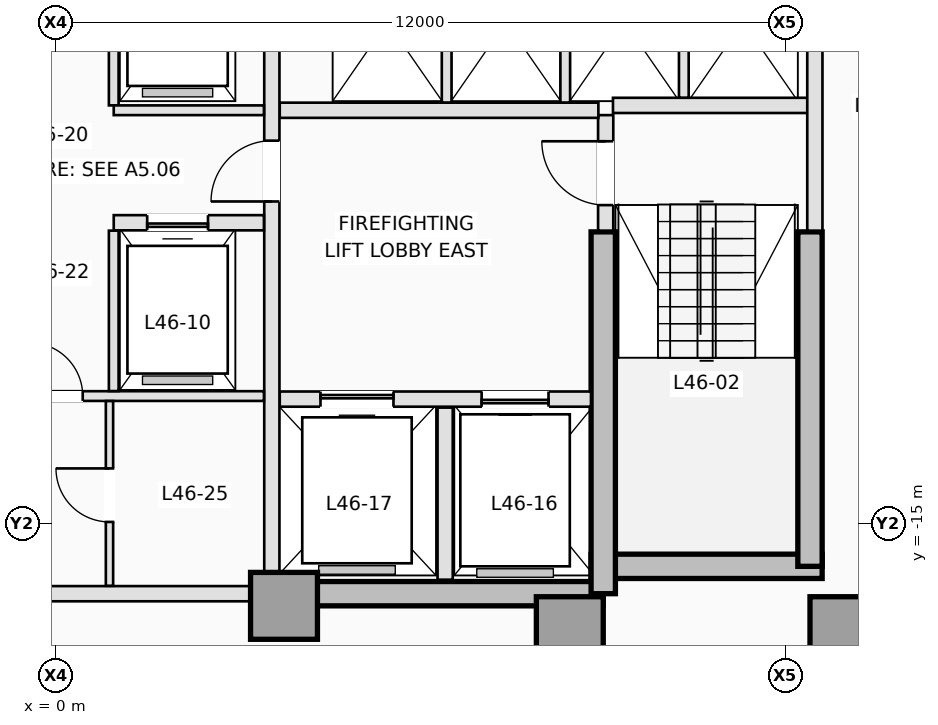
"""IFC4 building model, lengths in metres.
Left out: names, types, materials, properties, quantities, classifications, styles, units other than length and angle.
Written with IfcOpenShell. Run it as: python <this file> out.ifc"""

import sys

from ifc_helpers import new_model, si_unit, direction, frame, frame_2d, origin, origin_2d, place, context, subcontext, project, spatial, rectangle, extrude, element, fill, save


model = new_model("IFC4")
c1 = context("Model", 3, precision=1e-05, world=origin(), true_north=direction((0.0, 1.0)))
c2 = subcontext(c1, "Body", "Model", "MODEL_VIEW")
j1 = project(units=[si_unit("LENGTHUNIT", "METRE"), si_unit("PLANEANGLEUNIT", "RADIAN")], contexts=[c1])
p1 = place(None, origin())
s1 = spatial("IfcSite", under=j1, at=p1, CompositionType="ELEMENT")
p2 = place(p1, origin())
s2 = spatial("IfcBuilding", under=s1, at=p2, CompositionType="ELEMENT")
p3 = place(p2, frame((0.0, 0.0, 168.5)))
s3 = spatial("IfcBuildingStorey", under=s2, at=p3, CompositionType="ELEMENT", Elevation=168.5)
p4 = place(p3, frame((3.75, -16.15, 0.0), z_axis=(0.0, 0.0, 1.0), x_axis=(1.0, 0.0, 0.0)))
e1 = element("IfcWall", 1, at=p4, inside=s3, PredefinedType="SHEAR", context=c2, shape_type="SweptSolid", body=[
    extrude(rectangle(XDim=5.25, YDim=0.4, at=frame_2d((2.625, 0.0))), origin(), (0.0, 0.0, 1.0), 3.5),
])
p5 = place(p3, frame((8.8, -15.7, 0.0), z_axis=(0.0, 0.0, 1.0), x_axis=(1.0, 0.0, 0.0)))
e2 = element("IfcWall", 2, at=p5, inside=s3, PredefinedType="SHEAR", context=c2, shape_type="SweptSolid", body=[
    extrude(rectangle(XDim=3.8, YDim=0.4, at=frame_2d((1.9, 0.0))), origin(), (0.0, 0.0, 1.0), 3.5),
])
p6 = place(p3, frame((12.4, -15.7, 0.0), z_axis=(0.0, 0.0, 1.0), x_axis=(0.0, 1.0, 0.0)))
e3 = element("IfcWall", 3, at=p6, inside=s3, PredefinedType="SHEAR", context=c2, shape_type="SweptSolid", body=[
    extrude(rectangle(XDim=5.5, YDim=0.4, at=frame_2d((2.75, 0.0))), origin(), (0.0, 0.0, 1.0), 3.5),
])
p7 = place(p3, frame((9.0, -16.15, 0.0), z_axis=(0.0, 0.0, 1.0), x_axis=(0.0, 1.0, 0.0)))
e4 = element("IfcWall", 4, at=p7, inside=s3, PredefinedType="SHEAR", context=c2, shape_type="SweptSolid", body=[
    extrude(rectangle(XDim=5.95, YDim=0.4, at=frame_2d((2.975, 0.0))), origin(), (0.0, 0.0, 1.0), 3.5),
])
for number, where, z_axis, x_axis in (
    (5, (3.75, -16.35, 0.0), (0.0, 0.0, 1.0), (1.0, 0.0, 0.0)),
    (6, (8.45, -16.75, 0.0), (0.0, 0.0, 1.0), (1.0, 0.0, 0.0)),
    (7, (12.95, -16.75, 0.0), (0.0, 0.0, 1.0), (1.0, 0.0, 0.0)),
):
    element("IfcColumn", number, at=place(p3, frame(where, z_axis=z_axis, x_axis=x_axis)), inside=s3, PredefinedType="COLUMN", context=c2, shape_type="SweptSolid", body=[
        extrude(rectangle(XDim=1.1, YDim=1.1, at=origin_2d()), origin(), (0.0, 0.0, 1.0), 3.5),
    ])
p8 = place(p3, frame((9.04, -10.18, 0.0), z_axis=(0.0, 0.0, 1.0), x_axis=(0.0, 1.0, 0.0)))
e8 = element("IfcWall", 8, at=p8, inside=s3, PredefinedType="PARTITIONING", context=c2, shape_type="SweptSolid", body=[
    extrude(rectangle(XDim=1.9, YDim=0.25, at=frame_2d((0.95, 0.0))), origin(), (0.0, 0.0, 1.0), 3.25),
])
p9 = place(p8, frame((0.42, 0.0, 0.0)))
e9 = element("IfcOpeningElement", 9, at=p9, cuts=e8, PredefinedType="OPENING", context=c2, shape_type="SweptSolid", body=[
    extrude(rectangle(XDim=1.05, YDim=2.15, at=frame_2d((0.525, 1.075))), frame((0.0, 0.135, 0.0), z_axis=(0.0, -1.0, 0.0), x_axis=(1.0, 0.0, 0.0)), (0.0, 0.0, 1.0), 0.27),
])
p10 = place(p3, frame((9.16, -8.12, 0.0), z_axis=(0.0, 0.0, 1.0), x_axis=(1.0, 0.0, 0.0)))
e10 = element("IfcWall", 10, at=p10, inside=s3, PredefinedType="PARTITIONING", context=c2, shape_type="SweptSolid", body=[
    extrude(rectangle(XDim=3.22, YDim=0.25, at=frame_2d((1.61, 0.0))), origin(), (0.0, 0.0, 1.0), 3.25),
])
p11 = place(p3, frame((12.48, -10.18, 0.0), z_axis=(0.0, 0.0, 1.0), x_axis=(0.0, 1.0, 0.0)))
e11 = element("IfcWall", 11, at=p11, inside=s3, PredefinedType="PARTITIONING", context=c2, shape_type="SweptSolid", body=[
    extrude(rectangle(XDim=4.828, YDim=0.25, at=frame_2d((2.414, 0.0))), origin(), (0.0, 0.0, 1.0), 3.25),
])
p12 = place(p3, frame((3.68, -12.95, 0.0), z_axis=(0.0, 0.0, 1.0), x_axis=(1.0, 0.0, 0.0)))
e12 = element("IfcWall", 12, at=p12, inside=s3, PredefinedType="PARTITIONING", context=c2, shape_type="SweptSolid", body=[
    extrude(rectangle(XDim=5.118, YDim=0.25, at=frame_2d((2.559, 0.0))), origin(), (0.0, 0.0, 1.0), 3.25),
])
p13 = place(p12, frame((3.32, 0.0, 0.0)))
e13 = element("IfcOpeningElement", 13, at=p13, cuts=e12, PredefinedType="OPENING", context=c2, shape_type="SweptSolid", body=[
    extrude(rectangle(XDim=1.1, YDim=2.15, at=frame_2d((0.55, 1.075))), frame((0.0, 0.135, 0.0), z_axis=(0.0, -1.0, 0.0), x_axis=(1.0, 0.0, 0.0)), (0.0, 0.0, 1.0), 0.27),
])
p14 = place(p12, frame((0.67, 0.0, 0.0)))
e14 = element("IfcOpeningElement", 14, at=p14, cuts=e12, PredefinedType="OPENING", context=c2, shape_type="SweptSolid", body=[
    extrude(rectangle(XDim=1.2, YDim=2.15, at=frame_2d((0.6, 1.075))), frame((0.0, 0.135, 0.0), z_axis=(0.0, -1.0, 0.0), x_axis=(1.0, 0.0, 0.0)), (0.0, 0.0, 1.0), 0.27),
])
p15 = place(p3, frame((6.4, -15.92, 0.0), z_axis=(0.0, 0.0, 1.0), x_axis=(0.0, 1.0, 0.0)))
e15 = element("IfcWall", 15, at=p15, inside=s3, PredefinedType="PARTITIONING", context=c2, shape_type="SweptSolid", body=[
    extrude(rectangle(XDim=2.83, YDim=0.25, at=frame_2d((1.415, 0.0))), origin(), (0.0, 0.0, 1.0), 3.25),
])
p16 = place(p3, frame((3.68, -8.2, 0.0), z_axis=(0.0, 0.0, 1.0), x_axis=(1.0, 0.0, 0.0)))
e16 = element("IfcWall", 16, at=p16, inside=s3, PredefinedType="PARTITIONING", context=c2, shape_type="SweptSolid", body=[
    extrude(rectangle(XDim=5.24, YDim=0.25, at=frame_2d((2.62, 0.0))), origin(), (0.0, 0.0, 1.0), 3.25),
])
p17 = place(p3, frame((3.55, -15.798, 0.0), z_axis=(0.0, 0.0, 1.0), x_axis=(0.0, 1.0, 0.0)))
e17 = element("IfcWall", 17, at=p17, inside=s3, PredefinedType="PARTITIONING", context=c2, shape_type="SweptSolid", body=[
    extrude(rectangle(XDim=10.446, YDim=0.25, at=frame_2d((5.223, 0.0))), origin(), (0.0, 0.0, 1.0), 3.25),
])
p18 = place(p17, frame((6.098, 0.0, 0.0)))
e18 = element("IfcOpeningElement", 18, at=p18, cuts=e17, PredefinedType="OPENING", context=c2, shape_type="SweptSolid", body=[
    extrude(rectangle(XDim=1.0, YDim=2.15, at=frame_2d((0.5, 1.075))), frame((0.0, 0.135, 0.0), z_axis=(0.0, -1.0, 0.0), x_axis=(1.0, 0.0, 0.0)), (0.0, 0.0, 1.0), 0.27),
])
for number, where, z_axis, x_axis in (
    (19, (6.425, -8.073, 0.0), (0.0, 0.0, 1.0), (0.0, 1.0, 0.0)),
    (20, (8.375, -8.073, 0.0), (0.0, 0.0, 1.0), (0.0, 1.0, 0.0)),
):
    element("IfcWall", number, at=place(p3, frame(where, z_axis=z_axis, x_axis=x_axis)), inside=s3, PredefinedType="PARTITIONING", context=c2, shape_type="SweptSolid", body=[
        extrude(rectangle(XDim=2.733, YDim=0.16, at=frame_2d((1.366, 0.0))), origin(), (0.0, 0.0, 1.0), 3.25),
    ])
p19 = place(p3, frame((10.325, -7.993, 0.0), z_axis=(0.0, 0.0, 1.0), x_axis=(0.0, 1.0, 0.0)))
e21 = element("IfcWall", 21, at=p19, inside=s3, PredefinedType="PARTITIONING", context=c2, shape_type="SweptSolid", body=[
    extrude(rectangle(XDim=2.653, YDim=0.16, at=frame_2d((1.326, 0.0))), origin(), (0.0, 0.0, 1.0), 3.25),
])
p20 = place(p3, frame((-3.198, -16.15, 0.0), z_axis=(0.0, 0.0, 1.0), x_axis=(1.0, 0.0, 0.0)))
e22 = element("IfcWall", 22, at=p20, inside=s3, PredefinedType="PARTITIONING", context=c2, shape_type="SweptSolid", body=[
    extrude(rectangle(XDim=6.396, YDim=0.25, at=frame_2d((3.198, 0.0))), origin(), (0.0, 0.0, 1.0), 2.45),
])
p21 = place(p3, frame((0.95, -8.12, 0.0), z_axis=(0.0, 0.0, 1.0), x_axis=(0.0, 1.0, 0.0)))
e23 = element("IfcWall", 23, at=p21, inside=s3, PredefinedType="PARTITIONING", context=c2, shape_type="SweptSolid", body=[
    extrude(rectangle(XDim=2.78, YDim=0.16, at=frame_2d((1.39, 0.0))), origin(), (0.0, 0.0, 1.0), 3.25),
])
p22 = place(p3, frame((0.95, -8.2, 0.0), z_axis=(0.0, 0.0, 1.0), x_axis=(1.0, 0.0, 0.0)))
e24 = element("IfcWall", 24, at=p22, inside=s3, PredefinedType="PARTITIONING", context=c2, shape_type="SweptSolid", body=[
    extrude(rectangle(XDim=2.47, YDim=0.16, at=frame_2d((1.235, 0.0))), origin(), (0.0, 0.0, 1.0), 3.25),
])
p23 = place(p3, frame((0.95, -10.05, 0.0), z_axis=(0.0, 0.0, 1.0), x_axis=(1.0, 0.0, 0.0)))
e25 = element("IfcWall", 25, at=p23, inside=s3, PredefinedType="PARTITIONING", context=c2, shape_type="SweptSolid", body=[
    extrude(rectangle(XDim=2.47, YDim=0.25, at=frame_2d((1.235, 0.0))), origin(), (0.0, 0.0, 1.0), 3.25),
])
p24 = place(p23, frame((0.55, 0.0, 0.0)))
e26 = element("IfcOpeningElement", 26, at=p24, cuts=e25, PredefinedType="OPENING", context=c2, shape_type="SweptSolid", body=[
    extrude(rectangle(XDim=1.0, YDim=2.15, at=frame_2d((0.5, 1.075))), frame((0.0, 0.135, 0.0), z_axis=(0.0, -1.0, 0.0), x_axis=(1.0, 0.0, 0.0)), (0.0, 0.0, 1.0), 0.27),
])
p25 = place(p3, frame((-3.42, -12.9, 0.0), z_axis=(0.0, 0.0, 1.0), x_axis=(1.0, 0.0, 0.0)))
e27 = element("IfcWall", 27, at=p25, inside=s3, PredefinedType="PARTITIONING", context=c2, shape_type="SweptSolid", body=[
    extrude(rectangle(XDim=6.84, YDim=0.16, at=frame_2d((3.42, 0.0))), origin(), (0.0, 0.0, 1.0), 3.25),
])
p26 = place(p25, frame((2.98, 0.0, 0.0)))
e28 = element("IfcOpeningElement", 28, at=p26, cuts=e27, PredefinedType="OPENING", context=c2, shape_type="SweptSolid", body=[
    extrude(rectangle(XDim=0.88, YDim=2.12, at=frame_2d((0.44, 1.06))), frame((0.0, 0.09, 0.0), z_axis=(0.0, -1.0, 0.0), x_axis=(1.0, 0.0, 0.0)), (0.0, 0.0, 1.0), 0.18),
])
p27 = place(p3, frame((0.95, -12.818, 0.0), z_axis=(0.0, 0.0, 1.0), x_axis=(0.0, 1.0, 0.0)))
e29 = element("IfcWall", 29, at=p27, inside=s3, PredefinedType="PARTITIONING", context=c2, shape_type="SweptSolid", body=[
    extrude(rectangle(XDim=2.638, YDim=0.16, at=frame_2d((1.319, 0.0))), origin(), (0.0, 0.0, 1.0), 3.25),
])
p28 = place(p3, frame((0.88, -16.02, 0.0), z_axis=(0.0, 0.0, 1.0), x_axis=(0.0, 1.0, 0.0)))
e30 = element("IfcWall", 30, at=p28, inside=s3, PredefinedType="PARTITIONING", context=c2, shape_type="SweptSolid", body=[
    extrude(rectangle(XDim=3.038, YDim=0.12, at=frame_2d((1.519, 0.0))), origin(), (0.0, 0.0, 1.0), 3.25),
])
p29 = place(p28, frame((1.05, 0.0, 0.0)))
e31 = element("IfcOpeningElement", 31, at=p29, cuts=e30, PredefinedType="OPENING", context=c2, shape_type="SweptSolid", body=[
    extrude(rectangle(XDim=0.88, YDim=2.12, at=frame_2d((0.44, 1.06))), frame((0.0, 0.07, 0.0), z_axis=(0.0, -1.0, 0.0), x_axis=(1.0, 0.0, 0.0)), (0.0, 0.0, 1.0), 0.14),
])
p30 = place(p13, origin())
e32 = element("IfcDoor", 32, at=p30, inside=s3, OperationType="SLIDING_TO_RIGHT", PredefinedType="DOOR", context=c2, shape_type="SweptSolid", body=[
    extrude(rectangle(XDim=1.1, YDim=2.15, at=frame_2d((0.55, 1.075))), frame((0.0, 0.025, 0.0), z_axis=(0.0, -1.0, 0.0), x_axis=(1.0, 0.0, 0.0)), (0.0, 0.0, 1.0), 0.05),
])
fill(e13, e32)
p31 = place(p14, origin())
e33 = element("IfcDoor", 33, at=p31, inside=s3, OperationType="SLIDING_TO_LEFT", PredefinedType="DOOR", context=c2, shape_type="SweptSolid", body=[
    extrude(rectangle(XDim=1.2, YDim=2.15, at=frame_2d((0.6, 1.075))), frame((0.0, 0.025, 0.0), z_axis=(0.0, -1.0, 0.0), x_axis=(1.0, 0.0, 0.0)), (0.0, 0.0, 1.0), 0.05),
])
fill(e14, e33)
p32 = place(p24, origin())
e34 = element("IfcDoor", 34, at=p32, inside=s3, OperationType="SLIDING_TO_RIGHT", PredefinedType="DOOR", context=c2, shape_type="SweptSolid", body=[
    extrude(rectangle(XDim=1.0, YDim=2.15, at=frame_2d((0.5, 1.075))), frame((0.0, 0.025, 0.0), z_axis=(0.0, -1.0, 0.0), x_axis=(1.0, 0.0, 0.0)), (0.0, 0.0, 1.0), 0.05),
])
fill(e26, e34)
p33 = place(p9, origin())
e35 = element("IfcDoor", 35, at=p33, inside=s3, OperationType="SINGLE_SWING_RIGHT", PredefinedType="DOOR", context=c2, shape_type="SweptSolid", body=[
    extrude(rectangle(XDim=1.05, YDim=2.15, at=frame_2d((0.525, 1.075))), frame((0.0, 0.025, 0.0), z_axis=(0.0, -1.0, 0.0), x_axis=(1.0, 0.0, 0.0)), (0.0, 0.0, 1.0), 0.05),
])
fill(e9, e35)
p34 = place(p18, origin())
e36 = element("IfcDoor", 36, at=p34, inside=s3, OperationType="SINGLE_SWING_LEFT", PredefinedType="DOOR", context=c2, shape_type="SweptSolid", body=[
    extrude(rectangle(XDim=1.0, YDim=2.15, at=frame_2d((0.5, 1.075))), frame((0.0, 0.025, 0.0), z_axis=(0.0, -1.0, 0.0), x_axis=(1.0, 0.0, 0.0)), (0.0, 0.0, 1.0), 0.05),
])
fill(e18, e36)
p35 = place(p26, origin())
e37 = element("IfcDoor", 37, at=p35, inside=s3, OperationType="SINGLE_SWING_LEFT", PredefinedType="DOOR", context=c2, shape_type="SweptSolid", body=[
    extrude(rectangle(XDim=0.88, YDim=2.12, at=frame_2d((0.44, 1.06))), frame((0.0, 0.025, 0.0), z_axis=(0.0, -1.0, 0.0), x_axis=(1.0, 0.0, 0.0)), (0.0, 0.0, 1.0), 0.05),
])
fill(e28, e37)
p36 = place(p29, origin())
e38 = element("IfcDoor", 38, at=p36, inside=s3, OperationType="SINGLE_SWING_RIGHT", PredefinedType="DOOR", context=c2, shape_type="SweptSolid", body=[
    extrude(rectangle(XDim=0.88, YDim=2.12, at=frame_2d((0.44, 1.06))), frame((0.0, 0.025, 0.0), z_axis=(0.0, -1.0, 0.0), x_axis=(1.0, 0.0, 0.0)), (0.0, 0.0, 1.0), 0.05),
])
fill(e31, e38)
save(model, sys.argv[1])
